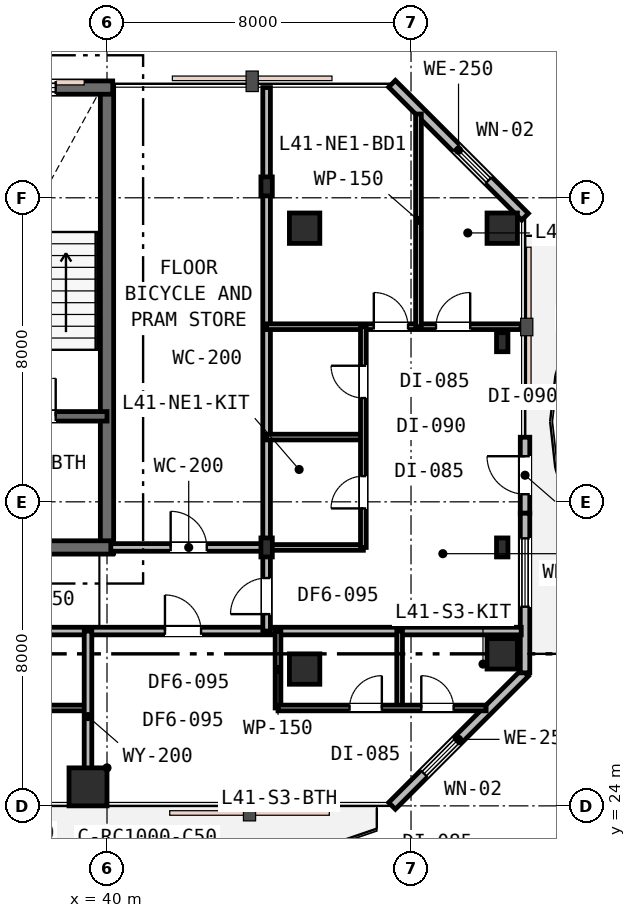
"""IFC4 building model, lengths in metres.
Left out: names, types, materials, properties, quantities, classifications, styles, units other than length and angle.
Written with IfcOpenShell. Run it as: python <this file> out.ifc"""

import sys

from ifc_helpers import new_model, si_unit, direction, frame, frame_2d, origin, origin_2d, place, context, subcontext, project, spatial, rectangle, i_section, extrude, element, fill, save


model = new_model("IFC4")
c1 = context("Model", 3, precision=1e-05, world=origin(), true_north=direction((0.0, 1.0)))
c2 = subcontext(c1, "Body", "Model", "MODEL_VIEW")
j1 = project(units=[si_unit("LENGTHUNIT", "METRE"), si_unit("PLANEANGLEUNIT", "RADIAN")], contexts=[c1])
p1 = place(None, origin())
s1 = spatial("IfcSite", under=j1, at=p1, CompositionType="ELEMENT")
p2 = place(p1, origin())
s2 = spatial("IfcBuilding", under=s1, at=p2, CompositionType="ELEMENT")
p3 = place(p2, frame((0.0, 0.0, 161.4)))
s3 = spatial("IfcBuildingStorey", under=s2, at=p3, CompositionType="ELEMENT", Elevation=161.4)
p4 = place(p3, frame((40.0, 30.65, 0.0), z_axis=(0.0, 0.0, 1.0), x_axis=(0.0, 1.0, 0.0)))
e1 = element("IfcWall", 1, at=p4, inside=s3, PredefinedType="SHEAR", context=c2, shape_type="SweptSolid", body=[
    extrude(rectangle(XDim=12.3, YDim=0.35, at=frame_2d((6.15, 0.0))), origin(), (0.0, 0.0, 1.0), 3.6),
])
p5 = place(p3, frame((15.85, 42.9, 0.0), z_axis=(0.0, 0.0, 1.0), x_axis=(1.0, 0.0, 0.0)))
e2 = element("IfcWall", 2, at=p5, inside=s3, PredefinedType="SHEAR", context=c2, shape_type="SweptSolid", body=[
    extrude(rectangle(XDim=24.3, YDim=0.35, at=frame_2d((12.15, 0.0))), origin(), (0.0, 0.0, 1.0), 3.6),
])
p6 = place(p5, frame((1.6, 0.0, 0.95)))
e3 = element("IfcOpeningElement", 3, at=p6, cuts=e2, PredefinedType="OPENING", context=c2, shape_type="SweptSolid", body=[
    extrude(rectangle(XDim=1.2, YDim=1.6, at=frame_2d((0.6, 0.8))), frame((0.0, 0.185, 0.0), z_axis=(0.0, -1.0, 0.0), x_axis=(1.0, 0.0, 0.0)), (0.0, 0.0, 1.0), 0.37),
])
p7 = place(p5, frame((16.5, 0.0, 0.95)))
e4 = element("IfcOpeningElement", 4, at=p7, cuts=e2, PredefinedType="OPENING", context=c2, shape_type="SweptSolid", body=[
    extrude(rectangle(XDim=1.2, YDim=1.6, at=frame_2d((0.6, 0.8))), frame((0.0, 0.185, 0.0), z_axis=(0.0, -1.0, 0.0), x_axis=(1.0, 0.0, 0.0)), (0.0, 0.0, 1.0), 0.37),
])
p8 = place(p5, frame((21.6, 0.0, 0.95)))
e5 = element("IfcOpeningElement", 5, at=p8, cuts=e2, PredefinedType="OPENING", context=c2, shape_type="SweptSolid", body=[
    extrude(rectangle(XDim=1.2, YDim=1.6, at=frame_2d((0.6, 0.8))), frame((0.0, 0.185, 0.0), z_axis=(0.0, -1.0, 0.0), x_axis=(1.0, 0.0, 0.0)), (0.0, 0.0, 1.0), 0.37),
])
p9 = place(p3, frame((28.95, 30.8, 0.0), z_axis=(0.0, 0.0, 1.0), x_axis=(1.0, 0.0, 0.0)))
e6 = element("IfcWall", 6, at=p9, inside=s3, PredefinedType="SHEAR", context=c2, shape_type="SweptSolid", body=[
    extrude(rectangle(XDim=11.2, YDim=0.35, at=frame_2d((5.6, 0.0))), origin(), (0.0, 0.0, 1.0), 3.6),
])
p10 = place(p9, frame((7.65, 0.0, 0.0)))
e7 = element("IfcOpeningElement", 7, at=p10, cuts=e6, PredefinedType="OPENING", context=c2, shape_type="SweptSolid", body=[
    extrude(rectangle(XDim=1.1, YDim=2.15, at=frame_2d((0.55, 1.075))), frame((0.0, 0.185, 0.0), z_axis=(0.0, -1.0, 0.0), x_axis=(1.0, 0.0, 0.0)), (0.0, 0.0, 1.0), 0.37),
])
p11 = place(p3, frame((33.95, 34.25, 0.0), z_axis=(0.0, 0.0, 1.0), x_axis=(1.0, 0.0, 0.0)))
e8 = element("IfcWall", 8, at=p11, inside=s3, PredefinedType="SHEAR", context=c2, shape_type="SweptSolid", body=[
    extrude(rectangle(XDim=6.05, YDim=0.25, at=frame_2d((3.025, 0.0))), origin(), (0.0, 0.0, 1.0), 3.6),
])
p12 = place(p11, frame((3.7, 0.0, 0.0)))
e9 = element("IfcOpeningElement", 9, at=p12, cuts=e8, PredefinedType="OPENING", context=c2, shape_type="SweptSolid", body=[
    extrude(rectangle(XDim=1.0, YDim=2.15, at=frame_2d((0.5, 1.075))), frame((0.0, 0.135, 0.0), z_axis=(0.0, -1.0, 0.0), x_axis=(1.0, 0.0, 0.0)), (0.0, 0.0, 1.0), 0.27),
])
p13 = place(p11, frame((0.55, 0.0, 0.0)))
e10 = element("IfcOpeningElement", 10, at=p13, cuts=e8, PredefinedType="OPENING", context=c2, shape_type="SweptSolid", body=[
    extrude(rectangle(XDim=1.1, YDim=2.15, at=frame_2d((0.55, 1.075))), frame((0.0, 0.135, 0.0), z_axis=(0.0, -1.0, 0.0), x_axis=(1.0, 0.0, 0.0)), (0.0, 0.0, 1.0), 0.27),
])
p14 = place(p3, frame((39.5, 24.5, 0.0), z_axis=(0.0, 0.0, 1.0), x_axis=(1.0, 0.0, 0.0)))
e11 = element("IfcColumn", 11, at=p14, inside=s3, PredefinedType="COLUMN", context=c2, shape_type="SweptSolid", body=[
    extrude(rectangle(XDim=1.0, YDim=1.0, at=origin_2d()), origin(), (0.0, 0.0, 1.0), 3.6),
])
for number, where, z_axis, x_axis in (
    (12, (45.2, 27.6, 0.0), (0.0, 0.0, 1.0), (1.0, 0.0, 0.0)),
    (13, (45.2, 39.2, 0.0), (0.0, 0.0, 1.0), (1.0, 0.0, 0.0)),
    (14, (50.4, 28.0, 0.0), (0.0, 0.0, 1.0), (1.0, 0.0, 0.0)),
    (15, (50.4, 39.2, 0.0), (0.0, 0.0, 1.0), (1.0, 0.0, 0.0)),
):
    element("IfcColumn", number, at=place(p3, frame(where, z_axis=z_axis, x_axis=x_axis)), inside=s3, PredefinedType="COLUMN", context=c2, shape_type="SweptSolid", body=[
        extrude(rectangle(XDim=0.8, YDim=0.8, at=origin_2d()), origin(), (0.0, 0.0, 1.0), 3.6),
    ])
for number, where, z_axis, x_axis in (
    (16, (44.2, 30.8, 0.0), (0.0, 0.0, 1.0), (1.0, 0.0, 0.0)),
    (17, (44.2, 40.3, 0.0), (0.0, 0.0, 1.0), (1.0, 0.0, 0.0)),
    (18, (50.4, 30.8, 0.0), (0.0, 0.0, 1.0), (1.0, 0.0, 0.0)),
    (19, (50.4, 36.2, 0.0), (0.0, 0.0, 1.0), (1.0, 0.0, 0.0)),
):
    element("IfcColumn", number, at=place(p3, frame(where, z_axis=z_axis, x_axis=x_axis)), inside=s3, PredefinedType="COLUMN", context=c2, shape_type="SweptSolid", body=[
        extrude(i_section(OverallWidth=0.3, OverallDepth=0.5, WebThickness=0.015, FlangeThickness=0.028, FilletRadius=0.027, at=origin_2d()), origin(), (0.0, 0.0, 1.0), 3.6),
    ])
p15 = place(p3, frame((47.5, 24.0, 0.0), z_axis=(0.0, 0.0, 1.0), x_axis=(0.707106781187, 0.707106781187, 0.0)))
e20 = element("IfcWall", 20, at=p15, inside=s3, PredefinedType="STANDARD", context=c2, shape_type="SweptSolid", body=[
    extrude(rectangle(XDim=4.95, YDim=0.25, at=frame_2d((2.475, 0.0))), origin(), (0.0, 0.0, 1.0), 3.33),
])
p16 = place(p15, frame((1.196, 0.0, 0.85)))
e21 = element("IfcOpeningElement", 21, at=p16, cuts=e20, PredefinedType="OPENING", context=c2, shape_type="SweptSolid", body=[
    extrude(rectangle(XDim=1.2, YDim=1.6, at=frame_2d((0.6, 0.8))), frame((0.0, 0.135, 0.0), z_axis=(0.0, -1.0, 0.0), x_axis=(1.0, 0.0, 0.0)), (0.0, 0.0, 1.0), 0.27),
])
p17 = place(p3, frame((51.0, 31.7, 0.0), z_axis=(0.0, 0.0, 1.0), x_axis=(0.0, 1.0, 0.0)))
e22 = element("IfcWall", 22, at=p17, inside=s3, PredefinedType="STANDARD", context=c2, shape_type="SweptSolid", body=[
    extrude(rectangle(XDim=2.0, YDim=0.25, at=frame_2d((1.0, 0.0))), origin(), (0.0, 0.0, 1.0), 3.33),
])
p18 = place(p17, frame((0.5, 0.0, 0.0)))
e23 = element("IfcOpeningElement", 23, at=p18, cuts=e22, PredefinedType="OPENING", context=c2, shape_type="SweptSolid", body=[
    extrude(rectangle(XDim=1.0, YDim=2.15, at=frame_2d((0.5, 1.075))), frame((0.0, 0.135, 0.0), z_axis=(0.0, -1.0, 0.0), x_axis=(1.0, 0.0, 0.0)), (0.0, 0.0, 1.0), 0.27),
])
p19 = place(p3, frame((51.0, 27.5, 0.0), z_axis=(0.0, 0.0, 1.0), x_axis=(0.0, 1.0, 0.0)))
e24 = element("IfcWall", 24, at=p19, inside=s3, PredefinedType="STANDARD", context=c2, shape_type="SweptSolid", body=[
    extrude(rectangle(XDim=4.2, YDim=0.25, at=frame_2d((2.1, 0.0))), origin(), (0.0, 0.0, 1.0), 3.33),
])
p20 = place(p19, frame((1.74, 0.0, 0.75)))
e25 = element("IfcOpeningElement", 25, at=p20, cuts=e24, PredefinedType="OPENING", context=c2, shape_type="SweptSolid", body=[
    extrude(rectangle(XDim=1.8, YDim=1.85, at=frame_2d((0.9, 0.925))), frame((0.0, 0.135, 0.0), z_axis=(0.0, -1.0, 0.0), x_axis=(1.0, 0.0, 0.0)), (0.0, 0.0, 1.0), 0.27),
])
p21 = place(p3, frame((51.0, 39.5, 0.0), z_axis=(0.0, 0.0, 1.0), x_axis=(-0.707106781187, 0.707106781187, 0.0)))
e26 = element("IfcWall", 26, at=p21, inside=s3, PredefinedType="STANDARD", context=c2, shape_type="SweptSolid", body=[
    extrude(rectangle(XDim=4.95, YDim=0.25, at=frame_2d((2.475, 0.0))), origin(), (0.0, 0.0, 1.0), 3.33),
])
p22 = place(p21, frame((1.357, 0.0, 0.85)))
e27 = element("IfcOpeningElement", 27, at=p22, cuts=e26, PredefinedType="OPENING", context=c2, shape_type="SweptSolid", body=[
    extrude(rectangle(XDim=1.2, YDim=1.6, at=frame_2d((0.6, 0.8))), frame((0.0, 0.135, 0.0), z_axis=(0.0, -1.0, 0.0), x_axis=(1.0, 0.0, 0.0)), (0.0, 0.0, 1.0), 0.27),
])
p23 = place(p3, frame((19.6, 28.6, 0.0), z_axis=(0.0, 0.0, 1.0), x_axis=(1.0, 0.0, 0.0)))
e28 = element("IfcWall", 28, at=p23, inside=s3, PredefinedType="PARTITIONING", context=c2, shape_type="SweptSolid", body=[
    extrude(rectangle(XDim=31.3, YDim=0.2, at=frame_2d((15.65, 0.0))), origin(), (0.0, 0.0, 1.0), 2.93),
])
p24 = place(p23, frame((5.445, 0.0, 0.0)))
e29 = element("IfcOpeningElement", 29, at=p24, cuts=e28, PredefinedType="OPENING", context=c2, shape_type="SweptSolid", body=[
    extrude(rectangle(XDim=0.95, YDim=2.15, at=frame_2d((0.475, 1.075))), frame((0.0, 0.11, 0.0), z_axis=(0.0, -1.0, 0.0), x_axis=(1.0, 0.0, 0.0)), (0.0, 0.0, 1.0), 0.22),
])
p25 = place(p23, frame((13.35, 0.0, 0.0)))
e30 = element("IfcOpeningElement", 30, at=p25, cuts=e28, PredefinedType="OPENING", context=c2, shape_type="SweptSolid", body=[
    extrude(rectangle(XDim=0.95, YDim=2.15, at=frame_2d((0.475, 1.075))), frame((0.0, 0.11, 0.0), z_axis=(0.0, -1.0, 0.0), x_axis=(1.0, 0.0, 0.0)), (0.0, 0.0, 1.0), 0.22),
])
p26 = place(p23, frame((21.925, 0.0, 0.0)))
e31 = element("IfcOpeningElement", 31, at=p26, cuts=e28, PredefinedType="OPENING", context=c2, shape_type="SweptSolid", body=[
    extrude(rectangle(XDim=0.95, YDim=2.15, at=frame_2d((0.475, 1.075))), frame((0.0, 0.11, 0.0), z_axis=(0.0, -1.0, 0.0), x_axis=(1.0, 0.0, 0.0)), (0.0, 0.0, 1.0), 0.22),
])
p27 = place(p3, frame((40.1, 30.8, 0.0), z_axis=(0.0, 0.0, 1.0), x_axis=(1.0, 0.0, 0.0)))
e32 = element("IfcWall", 32, at=p27, inside=s3, PredefinedType="PARTITIONING", context=c2, shape_type="SweptSolid", body=[
    extrude(rectangle(XDim=4.1, YDim=0.2, at=frame_2d((2.05, 0.0))), origin(), (0.0, 0.0, 1.0), 2.93),
])
p28 = place(p27, frame((1.575, 0.0, 0.0)))
e33 = element("IfcOpeningElement", 33, at=p28, cuts=e32, PredefinedType="OPENING", context=c2, shape_type="SweptSolid", body=[
    extrude(rectangle(XDim=0.95, YDim=2.15, at=frame_2d((0.475, 1.075))), frame((0.0, 0.11, 0.0), z_axis=(0.0, -1.0, 0.0), x_axis=(1.0, 0.0, 0.0)), (0.0, 0.0, 1.0), 0.22),
])
p29 = place(p3, frame((44.2, 28.6, 0.0), z_axis=(0.0, 0.0, 1.0), x_axis=(0.0, 1.0, 0.0)))
e34 = element("IfcWall", 34, at=p29, inside=s3, PredefinedType="PARTITIONING", context=c2, shape_type="SweptSolid", body=[
    extrude(rectangle(XDim=14.3, YDim=0.2, at=frame_2d((7.15, 0.0))), origin(), (0.0, 0.0, 1.0), 2.93),
])
p30 = place(p29, frame((0.445, 0.0, 0.0)))
e35 = element("IfcOpeningElement", 35, at=p30, cuts=e34, PredefinedType="OPENING", context=c2, shape_type="SweptSolid", body=[
    extrude(rectangle(XDim=0.95, YDim=2.15, at=frame_2d((0.475, 1.075))), frame((0.0, 0.11, 0.0), z_axis=(0.0, -1.0, 0.0), x_axis=(1.0, 0.0, 0.0)), (0.0, 0.0, 1.0), 0.22),
])
for number, where, z_axis, x_axis in (
    (36, (44.2, 30.8, 0.0), (0.0, 0.0, 1.0), (1.0, 0.0, 0.0)),
    (37, (44.2, 33.704, 0.0), (0.0, 0.0, 1.0), (1.0, 0.0, 0.0)),
):
    element("IfcWall", number, at=place(p3, frame(where, z_axis=z_axis, x_axis=x_axis)), inside=s3, PredefinedType="PARTITIONING", context=c2, shape_type="SweptSolid", body=[
        extrude(rectangle(XDim=2.546, YDim=0.15, at=frame_2d((1.273, 0.0))), origin(), (0.0, 0.0, 1.0), 2.93),
    ])
p31 = place(p3, frame((44.2, 36.608, 0.0), z_axis=(0.0, 0.0, 1.0), x_axis=(1.0, 0.0, 0.0)))
e38 = element("IfcWall", 38, at=p31, inside=s3, PredefinedType="PARTITIONING", context=c2, shape_type="SweptSolid", body=[
    extrude(rectangle(XDim=6.7, YDim=0.15, at=frame_2d((3.35, 0.0))), origin(), (0.0, 0.0, 1.0), 2.93),
])
p32 = place(p31, frame((2.821, 0.0, 0.0)))
e39 = element("IfcOpeningElement", 39, at=p32, cuts=e38, PredefinedType="OPENING", context=c2, shape_type="SweptSolid", body=[
    extrude(rectangle(XDim=0.9, YDim=2.15, at=frame_2d((0.45, 1.075))), frame((0.0, 0.085, 0.0), z_axis=(0.0, -1.0, 0.0), x_axis=(1.0, 0.0, 0.0)), (0.0, 0.0, 1.0), 0.17),
])
p33 = place(p31, frame((4.457, 0.0, 0.0)))
e40 = element("IfcOpeningElement", 40, at=p33, cuts=e38, PredefinedType="OPENING", context=c2, shape_type="SweptSolid", body=[
    extrude(rectangle(XDim=0.9, YDim=2.15, at=frame_2d((0.45, 1.075))), frame((0.0, 0.085, 0.0), z_axis=(0.0, -1.0, 0.0), x_axis=(1.0, 0.0, 0.0)), (0.0, 0.0, 1.0), 0.17),
])
p34 = place(p3, frame((46.746, 30.8, 0.0), z_axis=(0.0, 0.0, 1.0), x_axis=(0.0, 1.0, 0.0)))
e41 = element("IfcWall", 41, at=p34, inside=s3, PredefinedType="PARTITIONING", context=c2, shape_type="SweptSolid", body=[
    extrude(rectangle(XDim=5.808, YDim=0.15, at=frame_2d((2.904, 0.0))), origin(), (0.0, 0.0, 1.0), 2.93),
])
p35 = place(p34, frame((1.027, 0.0, 0.0)))
e42 = element("IfcOpeningElement", 42, at=p35, cuts=e41, PredefinedType="OPENING", context=c2, shape_type="SweptSolid", body=[
    extrude(rectangle(XDim=0.85, YDim=2.15, at=frame_2d((0.425, 1.075))), frame((0.0, 0.085, 0.0), z_axis=(0.0, -1.0, 0.0), x_axis=(1.0, 0.0, 0.0)), (0.0, 0.0, 1.0), 0.17),
])
p36 = place(p34, frame((3.931, 0.0, 0.0)))
e43 = element("IfcOpeningElement", 43, at=p36, cuts=e41, PredefinedType="OPENING", context=c2, shape_type="SweptSolid", body=[
    extrude(rectangle(XDim=0.85, YDim=2.15, at=frame_2d((0.425, 1.075))), frame((0.0, 0.085, 0.0), z_axis=(0.0, -1.0, 0.0), x_axis=(1.0, 0.0, 0.0)), (0.0, 0.0, 1.0), 0.17),
])
p37 = place(p3, frame((48.196, 36.608, 0.0), z_axis=(0.0, 0.0, 1.0), x_axis=(0.0, 1.0, 0.0)))
e44 = element("IfcWall", 44, at=p37, inside=s3, PredefinedType="PARTITIONING", context=c2, shape_type="SweptSolid", body=[
    extrude(rectangle(XDim=5.596, YDim=0.15, at=frame_2d((2.798, 0.0))), origin(), (0.0, 0.0, 1.0), 3.01),
])
p38 = place(p3, frame((34.85, 26.576, 0.0), z_axis=(0.0, 0.0, 1.0), x_axis=(1.0, 0.0, 0.0)))
e45 = element("IfcWall", 45, at=p38, inside=s3, PredefinedType="PARTITIONING", context=c2, shape_type="SweptSolid", body=[
    extrude(rectangle(XDim=4.65, YDim=0.15, at=frame_2d((2.325, 0.0))), origin(), (0.0, 0.0, 1.0), 2.93),
])
p39 = place(p38, frame((0.738, 0.0, 0.0)))
e46 = element("IfcOpeningElement", 46, at=p39, cuts=e45, PredefinedType="OPENING", context=c2, shape_type="SweptSolid", body=[
    extrude(rectangle(XDim=0.85, YDim=2.15, at=frame_2d((0.425, 1.075))), frame((0.0, 0.085, 0.0), z_axis=(0.0, -1.0, 0.0), x_axis=(1.0, 0.0, 0.0)), (0.0, 0.0, 1.0), 0.17),
])
p40 = place(p38, frame((2.808, 0.0, 0.0)))
e47 = element("IfcOpeningElement", 47, at=p40, cuts=e45, PredefinedType="OPENING", context=c2, shape_type="SweptSolid", body=[
    extrude(rectangle(XDim=0.85, YDim=2.15, at=frame_2d((0.425, 1.075))), frame((0.0, 0.085, 0.0), z_axis=(0.0, -1.0, 0.0), x_axis=(1.0, 0.0, 0.0)), (0.0, 0.0, 1.0), 0.17),
])
p41 = place(p3, frame((39.5, 24.1, 0.0), z_axis=(0.0, 0.0, 1.0), x_axis=(0.0, 1.0, 0.0)))
e48 = element("IfcWall", 48, at=p41, inside=s3, PredefinedType="PARTITIONING", context=c2, shape_type="SweptSolid", body=[
    extrude(rectangle(XDim=4.5, YDim=0.2, at=frame_2d((2.25, 0.0))), origin(), (0.0, 0.0, 1.0), 2.93),
])
for number, where, z_axis, x_axis in (
    (49, (44.5, 26.576, 0.0), (0.0, 0.0, 1.0), (0.0, 1.0, 0.0)),
    (50, (47.7, 26.576, 0.0), (0.0, 0.0, 1.0), (0.0, 1.0, 0.0)),
):
    element("IfcWall", number, at=place(p3, frame(where, z_axis=z_axis, x_axis=x_axis)), inside=s3, PredefinedType="PARTITIONING", context=c2, shape_type="SweptSolid", body=[
        extrude(rectangle(XDim=2.024, YDim=0.15, at=frame_2d((1.012, 0.0))), origin(), (0.0, 0.0, 1.0), 3.33),
    ])
p42 = place(p3, frame((44.5, 26.576, 0.0), z_axis=(0.0, 0.0, 1.0), x_axis=(1.0, 0.0, 0.0)))
e51 = element("IfcWall", 51, at=p42, inside=s3, PredefinedType="PARTITIONING", context=c2, shape_type="SweptSolid", body=[
    extrude(rectangle(XDim=5.476, YDim=0.15, at=frame_2d((2.738, 0.0))), origin(), (0.0, 0.0, 1.0), 3.33),
])
p43 = place(p42, frame((1.882, 0.0, 0.0)))
e52 = element("IfcOpeningElement", 52, at=p43, cuts=e51, PredefinedType="OPENING", context=c2, shape_type="SweptSolid", body=[
    extrude(rectangle(XDim=0.85, YDim=2.15, at=frame_2d((0.425, 1.075))), frame((0.0, 0.085, 0.0), z_axis=(0.0, -1.0, 0.0), x_axis=(1.0, 0.0, 0.0)), (0.0, 0.0, 1.0), 0.17),
])
p44 = place(p42, frame((3.77, 0.0, 0.0)))
e53 = element("IfcOpeningElement", 53, at=p44, cuts=e51, PredefinedType="OPENING", context=c2, shape_type="SweptSolid", body=[
    extrude(rectangle(XDim=0.85, YDim=2.15, at=frame_2d((0.425, 1.075))), frame((0.0, 0.085, 0.0), z_axis=(0.0, -1.0, 0.0), x_axis=(1.0, 0.0, 0.0)), (0.0, 0.0, 1.0), 0.17),
])
p45 = place(p8, origin())
e54 = element("IfcWindow", 54, at=p45, inside=s3, PartitioningType="SINGLE_PANEL", PredefinedType="WINDOW", context=c2, shape_type="SweptSolid", body=[
    extrude(rectangle(XDim=1.2, YDim=1.6, at=frame_2d((0.6, 0.8))), frame((0.0, 0.03, 0.0), z_axis=(0.0, -1.0, 0.0), x_axis=(1.0, 0.0, 0.0)), (0.0, 0.0, 1.0), 0.06),
])
fill(e5, e54)
p46 = place(p16, origin())
e55 = element("IfcWindow", 55, at=p46, inside=s3, PartitioningType="SINGLE_PANEL", PredefinedType="WINDOW", context=c2, shape_type="SweptSolid", body=[
    extrude(rectangle(XDim=1.2, YDim=1.6, at=frame_2d((0.6, 0.8))), frame((0.0, 0.03, 0.0), z_axis=(0.0, -1.0, 0.0), x_axis=(1.0, 0.0, 0.0)), (0.0, 0.0, 1.0), 0.06),
])
fill(e21, e55)
p47 = place(p18, origin())
e56 = element("IfcDoor", 56, at=p47, inside=s3, OperationType="SINGLE_SWING_RIGHT", PredefinedType="DOOR", context=c2, shape_type="SweptSolid", body=[
    extrude(rectangle(XDim=1.0, YDim=2.15, at=frame_2d((0.5, 1.075))), frame((0.0, 0.025, 0.0), z_axis=(0.0, -1.0, 0.0), x_axis=(1.0, 0.0, 0.0)), (0.0, 0.0, 1.0), 0.05),
])
fill(e23, e56)
p48 = place(p20, origin())
e57 = element("IfcWindow", 57, at=p48, inside=s3, PartitioningType="SINGLE_PANEL", PredefinedType="WINDOW", context=c2, shape_type="SweptSolid", body=[
    extrude(rectangle(XDim=1.8, YDim=1.85, at=frame_2d((0.9, 0.925))), frame((0.0, 0.03, 0.0), z_axis=(0.0, -1.0, 0.0), x_axis=(1.0, 0.0, 0.0)), (0.0, 0.0, 1.0), 0.06),
])
fill(e25, e57)
p49 = place(p22, origin())
e58 = element("IfcWindow", 58, at=p49, inside=s3, PartitioningType="SINGLE_PANEL", PredefinedType="WINDOW", context=c2, shape_type="SweptSolid", body=[
    extrude(rectangle(XDim=1.2, YDim=1.6, at=frame_2d((0.6, 0.8))), frame((0.0, 0.03, 0.0), z_axis=(0.0, -1.0, 0.0), x_axis=(1.0, 0.0, 0.0)), (0.0, 0.0, 1.0), 0.06),
])
fill(e27, e58)
p50 = place(p12, origin())
e59 = element("IfcDoor", 59, at=p50, inside=s3, OperationType="SINGLE_SWING_RIGHT", PredefinedType="DOOR", context=c2, shape_type="SweptSolid", body=[
    extrude(rectangle(XDim=1.0, YDim=2.15, at=frame_2d((0.5, 1.075))), frame((0.0, 0.025, 0.0), z_axis=(0.0, -1.0, 0.0), x_axis=(1.0, 0.0, 0.0)), (0.0, 0.0, 1.0), 0.05),
])
fill(e9, e59)
p51 = place(p28, origin())
e60 = element("IfcDoor", 60, at=p51, inside=s3, OperationType="SINGLE_SWING_LEFT", PredefinedType="DOOR", context=c2, shape_type="SweptSolid", body=[
    extrude(rectangle(XDim=0.95, YDim=2.15, at=frame_2d((0.475, 1.075))), frame((0.0, 0.025, 0.0), z_axis=(0.0, -1.0, 0.0), x_axis=(1.0, 0.0, 0.0)), (0.0, 0.0, 1.0), 0.05),
])
fill(e33, e60)
p52 = place(p30, origin())
e61 = element("IfcDoor", 61, at=p52, inside=s3, OperationType="SINGLE_SWING_LEFT", PredefinedType="DOOR", context=c2, shape_type="SweptSolid", body=[
    extrude(rectangle(XDim=0.95, YDim=2.15, at=frame_2d((0.475, 1.075))), frame((0.0, 0.025, 0.0), z_axis=(0.0, -1.0, 0.0), x_axis=(1.0, 0.0, 0.0)), (0.0, 0.0, 1.0), 0.05),
])
fill(e35, e61)
p53 = place(p35, origin())
e62 = element("IfcDoor", 62, at=p53, inside=s3, OperationType="SINGLE_SWING_LEFT", PredefinedType="DOOR", context=c2, shape_type="SweptSolid", body=[
    extrude(rectangle(XDim=0.85, YDim=2.15, at=frame_2d((0.425, 1.075))), frame((0.0, 0.025, 0.0), z_axis=(0.0, -1.0, 0.0), x_axis=(1.0, 0.0, 0.0)), (0.0, 0.0, 1.0), 0.05),
])
fill(e42, e62)
p54 = place(p36, origin())
e63 = element("IfcDoor", 63, at=p54, inside=s3, OperationType="SINGLE_SWING_RIGHT", PredefinedType="DOOR", context=c2, shape_type="SweptSolid", body=[
    extrude(rectangle(XDim=0.85, YDim=2.15, at=frame_2d((0.425, 1.075))), frame((0.0, 0.025, 0.0), z_axis=(0.0, -1.0, 0.0), x_axis=(1.0, 0.0, 0.0)), (0.0, 0.0, 1.0), 0.05),
])
fill(e43, e63)
p55 = place(p32, origin())
e64 = element("IfcDoor", 64, at=p55, inside=s3, OperationType="SINGLE_SWING_LEFT", PredefinedType="DOOR", context=c2, shape_type="SweptSolid", body=[
    extrude(rectangle(XDim=0.9, YDim=2.15, at=frame_2d((0.45, 1.075))), frame((0.0, 0.025, 0.0), z_axis=(0.0, -1.0, 0.0), x_axis=(1.0, 0.0, 0.0)), (0.0, 0.0, 1.0), 0.05),
])
fill(e39, e64)
p56 = place(p33, origin())
e65 = element("IfcDoor", 65, at=p56, inside=s3, OperationType="SINGLE_SWING_RIGHT", PredefinedType="DOOR", context=c2, shape_type="SweptSolid", body=[
    extrude(rectangle(XDim=0.9, YDim=2.15, at=frame_2d((0.45, 1.075))), frame((0.0, 0.025, 0.0), z_axis=(0.0, -1.0, 0.0), x_axis=(1.0, 0.0, 0.0)), (0.0, 0.0, 1.0), 0.05),
])
fill(e40, e65)
p57 = place(p26, origin())
e66 = element("IfcDoor", 66, at=p57, inside=s3, OperationType="SINGLE_SWING_LEFT", PredefinedType="DOOR", context=c2, shape_type="SweptSolid", body=[
    extrude(rectangle(XDim=0.95, YDim=2.15, at=frame_2d((0.475, 1.075))), frame((0.0, 0.025, 0.0), z_axis=(0.0, -1.0, 0.0), x_axis=(1.0, 0.0, 0.0)), (0.0, 0.0, 1.0), 0.05),
])
fill(e31, e66)
p58 = place(p43, origin())
e67 = element("IfcDoor", 67, at=p58, inside=s3, OperationType="SINGLE_SWING_RIGHT", PredefinedType="DOOR", context=c2, shape_type="SweptSolid", body=[
    extrude(rectangle(XDim=0.85, YDim=2.15, at=frame_2d((0.425, 1.075))), frame((0.0, 0.025, 0.0), z_axis=(0.0, -1.0, 0.0), x_axis=(1.0, 0.0, 0.0)), (0.0, 0.0, 1.0), 0.05),
])
fill(e52, e67)
p59 = place(p44, origin())
e68 = element("IfcDoor", 68, at=p59, inside=s3, OperationType="SINGLE_SWING_LEFT", PredefinedType="DOOR", context=c2, shape_type="SweptSolid", body=[
    extrude(rectangle(XDim=0.85, YDim=2.15, at=frame_2d((0.425, 1.075))), frame((0.0, 0.025, 0.0), z_axis=(0.0, -1.0, 0.0), x_axis=(1.0, 0.0, 0.0)), (0.0, 0.0, 1.0), 0.05),
])
fill(e53, e68)
save(model, sys.argv[1])
